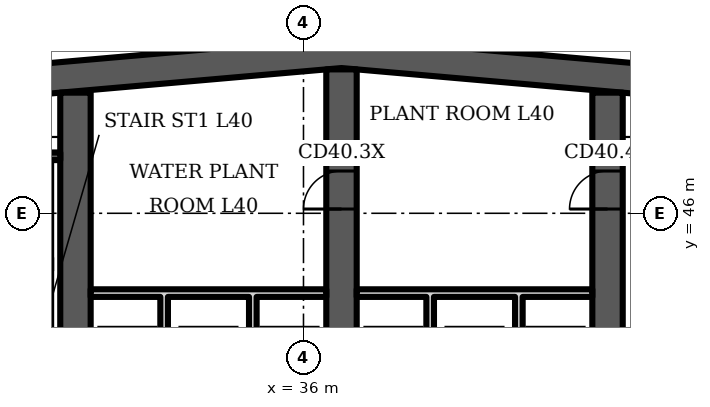
"""IFC4 building model, lengths in metres.
Left out: names, types, materials, properties, quantities, classifications, styles, units other than length and angle.
Written with IfcOpenShell. Run it as: python <this file> out.ifc"""

import sys

from ifc_helpers import new_model, si_unit, direction, frame, frame_2d, origin, place, context, subcontext, project, spatial, polyline, rectangle, outline, extrude, element, fill, save


model = new_model("IFC4")
c1 = context("Model", 3, precision=1e-05, world=origin(), true_north=direction((0.0, 1.0)))
c2 = subcontext(c1, "Body", "Model", "MODEL_VIEW")
j1 = project(units=[si_unit("LENGTHUNIT", "METRE"), si_unit("PLANEANGLEUNIT", "RADIAN")], contexts=[c1])
p1 = place(None, origin())
s1 = spatial("IfcSite", under=j1, at=p1, CompositionType="ELEMENT")
p2 = place(p1, origin())
s2 = spatial("IfcBuilding", under=s1, at=p2, CompositionType="ELEMENT")
p3 = place(p2, frame((0.0, 0.0, 166.3)))
s3 = spatial("IfcBuildingStorey", under=s2, at=p3, CompositionType="ELEMENT", Elevation=166.3)
p4 = place(p3, frame((0.0, 0.0, -0.0)))
e1 = element("IfcWall", 1, at=p4, inside=s3, PredefinedType="SHEAR", context=c2, shape_type="SweptSolid", body=[
    extrude(outline(polyline([(16.0, 47.984), (37.0, 49.822), (58.0, 47.984), (58.0, 48.787), (37.0, 50.625), (16.0, 48.787), (16.0, 47.984)])), origin(), (0.0, 0.0, 1.0), 3.6),
])
p5 = place(p3, frame((30.0, 34.8, 0.0), z_axis=(0.0, 0.0, 1.0), x_axis=(0.0, 1.0, 0.0)))
e2 = element("IfcWall", 2, at=p5, inside=s3, PredefinedType="SHEAR", context=c2, shape_type="SweptSolid", body=[
    extrude(rectangle(XDim=14.374, YDim=0.8, at=frame_2d((7.187, 0.0))), origin(), (0.0, 0.0, 1.0), 3.6),
])
p6 = place(p5, frame((3.6, 0.0, 0.0)))
e3 = element("IfcOpeningElement", 3, at=p6, cuts=e2, PredefinedType="OPENING", context=c2, shape_type="SweptSolid", body=[
    extrude(rectangle(XDim=1.1, YDim=2.1, at=frame_2d((0.55, 1.05))), frame((0.0, 0.41, 0.0), z_axis=(0.0, -1.0, 0.0), x_axis=(1.0, 0.0, 0.0)), (0.0, 0.0, 1.0), 0.82),
])
p7 = place(p3, frame((37.0, 34.8, 0.0), z_axis=(0.0, 0.0, 1.0), x_axis=(0.0, 1.0, 0.0)))
e4 = element("IfcWall", 4, at=p7, inside=s3, PredefinedType="SHEAR", context=c2, shape_type="SweptSolid", body=[
    extrude(rectangle(XDim=14.987, YDim=0.8, at=frame_2d((7.493, 0.0))), origin(), (0.0, 0.0, 1.0), 3.6),
])
p8 = place(p7, frame((11.312, 0.0, 0.0)))
e5 = element("IfcOpeningElement", 5, at=p8, cuts=e4, PredefinedType="OPENING", context=c2, shape_type="SweptSolid", body=[
    extrude(rectangle(XDim=1.0, YDim=2.1, at=frame_2d((0.5, 1.05))), frame((0.0, 0.41, 0.0), z_axis=(0.0, -1.0, 0.0), x_axis=(1.0, 0.0, 0.0)), (0.0, 0.0, 1.0), 0.82),
])
p9 = place(p7, frame((3.6, 0.0, 0.0)))
e6 = element("IfcOpeningElement", 6, at=p9, cuts=e4, PredefinedType="OPENING", context=c2, shape_type="SweptSolid", body=[
    extrude(rectangle(XDim=1.1, YDim=2.1, at=frame_2d((0.55, 1.05))), frame((0.0, 0.41, 0.0), z_axis=(0.0, -1.0, 0.0), x_axis=(1.0, 0.0, 0.0)), (0.0, 0.0, 1.0), 0.82),
])
p10 = place(p3, frame((44.0, 34.8, 0.0), z_axis=(0.0, 0.0, 1.0), x_axis=(0.0, 1.0, 0.0)))
e7 = element("IfcWall", 7, at=p10, inside=s3, PredefinedType="SHEAR", context=c2, shape_type="SweptSolid", body=[
    extrude(rectangle(XDim=14.374, YDim=0.8, at=frame_2d((7.187, 0.0))), origin(), (0.0, 0.0, 1.0), 3.6),
])
p11 = place(p10, frame((11.312, 0.0, 0.0)))
e8 = element("IfcOpeningElement", 8, at=p11, cuts=e7, PredefinedType="OPENING", context=c2, shape_type="SweptSolid", body=[
    extrude(rectangle(XDim=1.0, YDim=2.1, at=frame_2d((0.5, 1.05))), frame((0.0, 0.41, 0.0), z_axis=(0.0, -1.0, 0.0), x_axis=(1.0, 0.0, 0.0)), (0.0, 0.0, 1.0), 0.82),
])
p12 = place(p10, frame((3.6, 0.0, 0.0)))
e9 = element("IfcOpeningElement", 9, at=p12, cuts=e7, PredefinedType="OPENING", context=c2, shape_type="SweptSolid", body=[
    extrude(rectangle(XDim=1.1, YDim=2.1, at=frame_2d((0.55, 1.05))), frame((0.0, 0.41, 0.0), z_axis=(0.0, -1.0, 0.0), x_axis=(1.0, 0.0, 0.0)), (0.0, 0.0, 1.0), 0.82),
])
p13 = place(p3, frame((25.75, 47.5, 0.0), z_axis=(0.0, 0.0, 1.0), x_axis=(1.0, 0.0, 0.0)))
e10 = element("IfcWall", 10, at=p13, inside=s3, PredefinedType="SHEAR", context=c2, shape_type="SweptSolid", body=[
    extrude(rectangle(XDim=3.85, YDim=0.2, at=frame_2d((1.925, 0.0))), origin(), (0.0, 0.0, 1.0), 3.2),
])
p14 = place(p3, frame((0.0, 0.0, -0.0)))
e11 = element("IfcWall", 11, at=p14, inside=s3, PredefinedType="PARTITIONING", context=c2, shape_type="SweptSolid", body=[
    extrude(outline(polyline([(32.433, 40.8), (32.233, 40.8), (32.233, 43.8), (30.4, 43.8), (30.4, 44.0), (36.6, 44.0), (36.6, 43.8), (34.767, 43.8), (34.767, 40.8), (34.567, 40.8), (34.567, 43.8), (32.433, 43.8), (32.433, 40.8)])), origin(), (0.0, 0.0, 1.0), 3.2),
])
p15 = place(p3, frame((0.0, 0.0, -0.0)))
e12 = element("IfcWall", 12, at=p15, inside=s3, PredefinedType="PARTITIONING", context=c2, shape_type="SweptSolid", body=[
    extrude(outline(polyline([(39.433, 40.8), (39.233, 40.8), (39.233, 43.8), (37.4, 43.8), (37.4, 44.0), (43.6, 44.0), (43.6, 43.8), (41.767, 43.8), (41.767, 40.8), (41.567, 40.8), (41.567, 43.8), (39.433, 43.8), (39.433, 40.8)])), origin(), (0.0, 0.0, 1.0), 3.2),
])
p16 = place(p8, origin())
e13 = element("IfcDoor", 13, at=p16, inside=s3, OperationType="SINGLE_SWING_LEFT", PredefinedType="DOOR", context=c2, shape_type="SweptSolid", body=[
    extrude(rectangle(XDim=1.0, YDim=2.1, at=frame_2d((0.5, 1.05))), frame((0.0, 0.4, 0.0), z_axis=(0.0, -1.0, 0.0), x_axis=(1.0, 0.0, 0.0)), (0.0, 0.0, 1.0), 0.8),
])
fill(e5, e13)
p17 = place(p11, origin())
e14 = element("IfcDoor", 14, at=p17, inside=s3, OperationType="SINGLE_SWING_LEFT", PredefinedType="DOOR", context=c2, shape_type="SweptSolid", body=[
    extrude(rectangle(XDim=1.0, YDim=2.1, at=frame_2d((0.5, 1.05))), frame((0.0, 0.4, 0.0), z_axis=(0.0, -1.0, 0.0), x_axis=(1.0, 0.0, 0.0)), (0.0, 0.0, 1.0), 0.8),
])
fill(e8, e14)
save(model, sys.argv[1])
